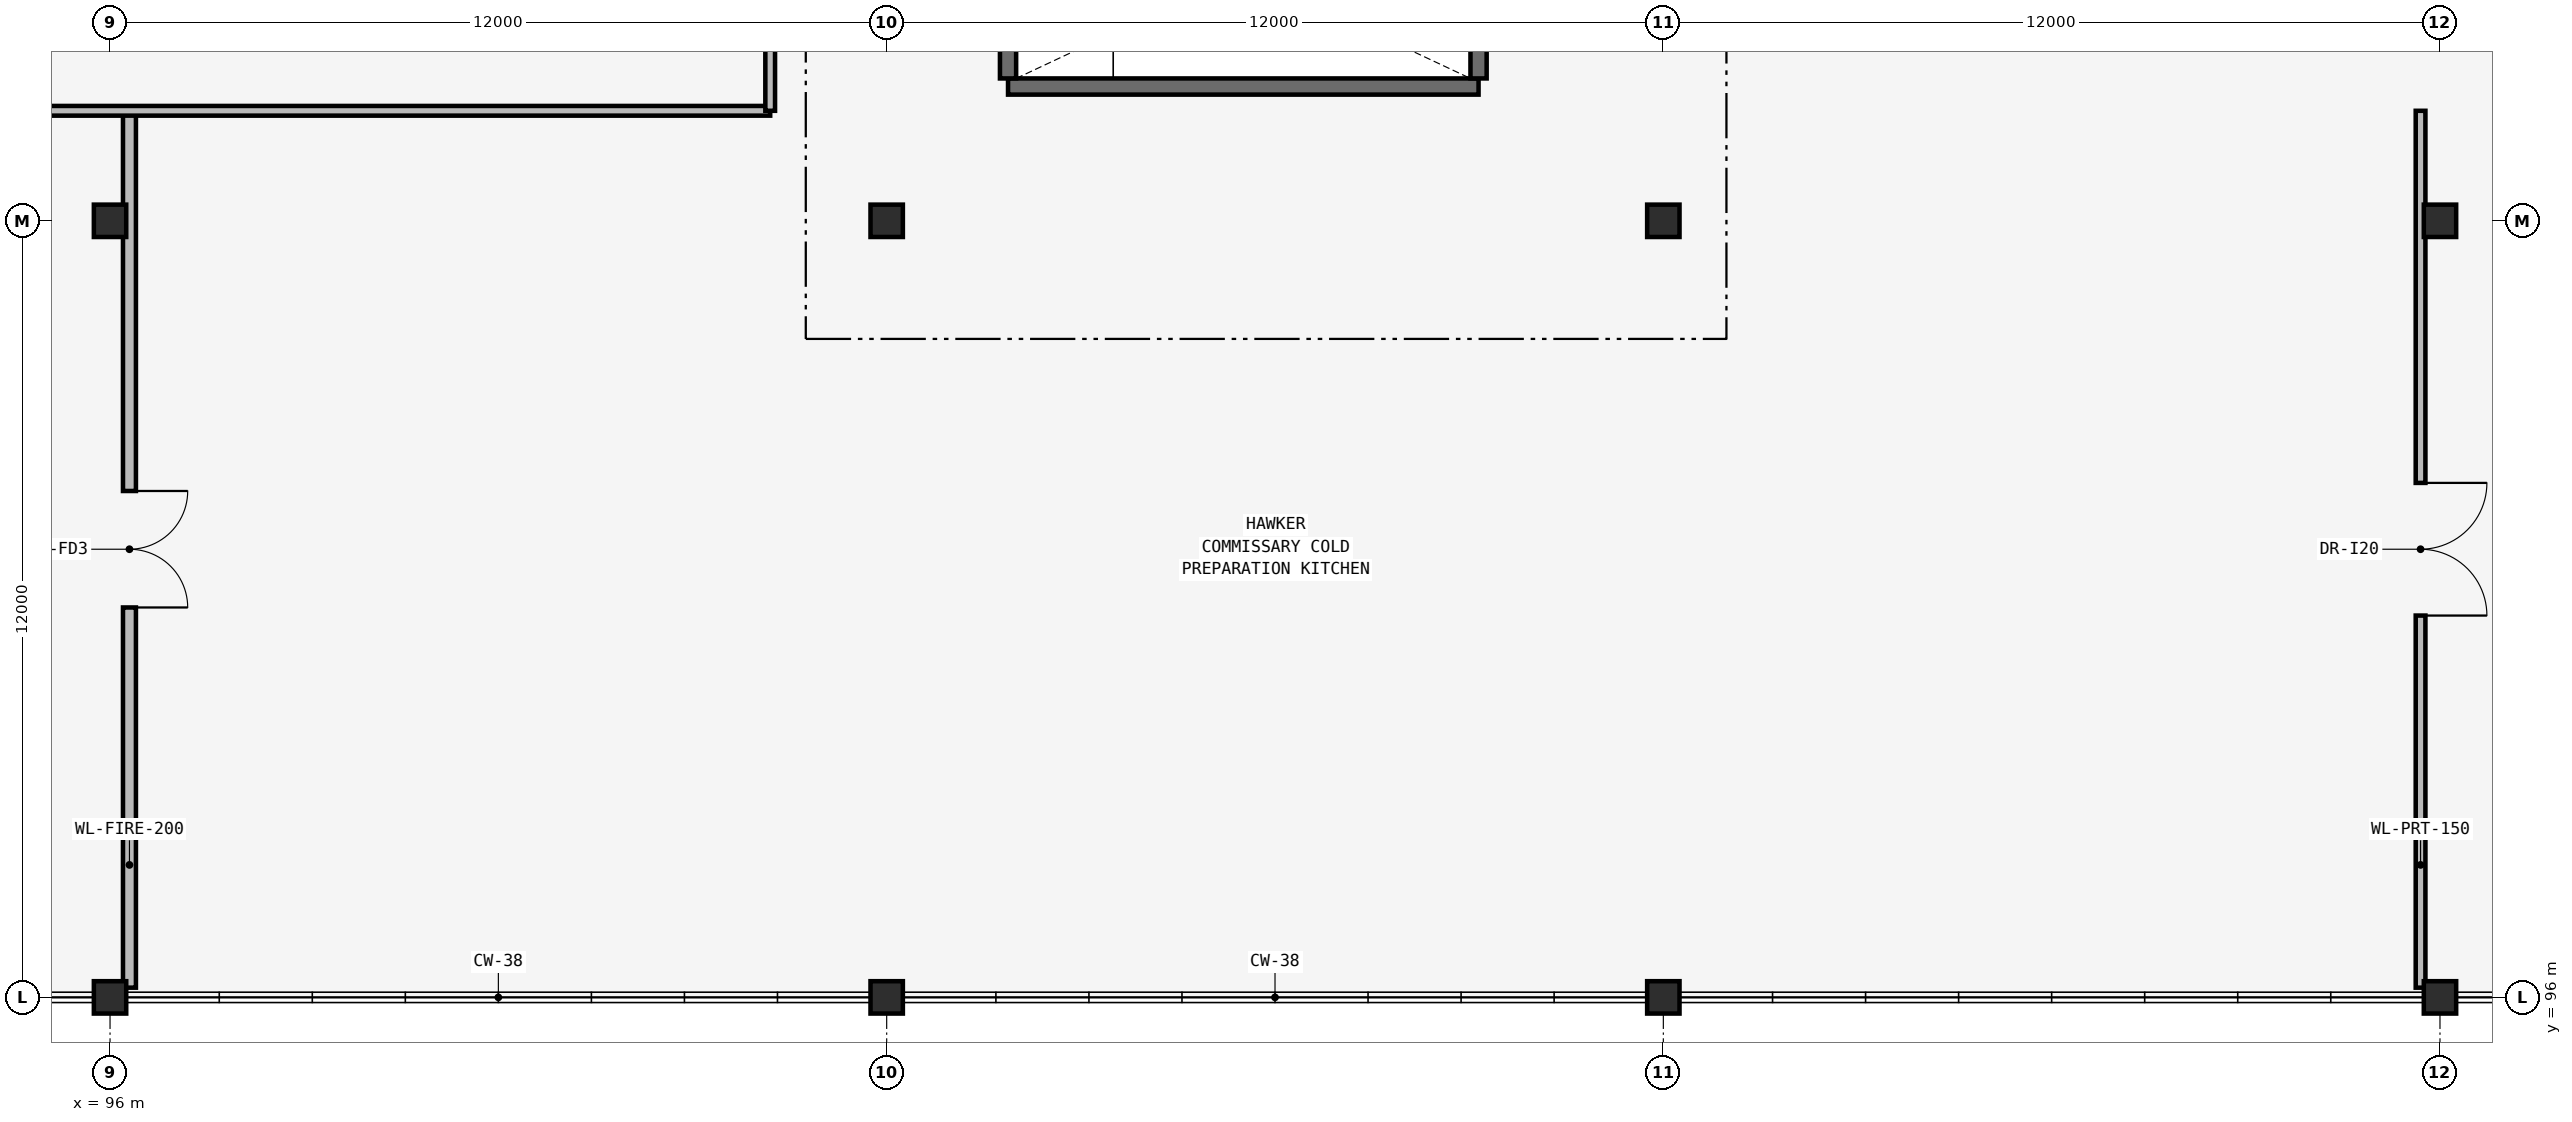
"""IFC4 building model, lengths in metres.
Left out: names, types, materials, properties, quantities, classifications, styles, units other than length and angle.
Written with IfcOpenShell. Run it as: python <this file> out.ifc"""

import sys

from ifc_helpers import new_model, si_unit, direction, frame, frame_2d, origin, origin_2d, place, context, subcontext, project, spatial, rectangle, extrude, element, fill, save


model = new_model("IFC4")
c1 = context("Model", 3, precision=1e-05, world=origin(), true_north=direction((0.0, 1.0)))
c2 = subcontext(c1, "Body", "Model", "MODEL_VIEW")
j1 = project(units=[si_unit("LENGTHUNIT", "METRE"), si_unit("PLANEANGLEUNIT", "RADIAN")], contexts=[c1])
p1 = place(None, origin())
s1 = spatial("IfcSite", under=j1, at=p1, CompositionType="ELEMENT")
p2 = place(p1, origin())
s2 = spatial("IfcBuilding", under=s1, at=p2, CompositionType="ELEMENT")
p3 = place(p2, frame((0.0, 0.0, 5.4)))
s3 = spatial("IfcBuildingStorey", under=s2, at=p3, CompositionType="ELEMENT", Elevation=5.4)
for number, where, z_axis, x_axis in (
    (1, (96.0, 96.0, 0.0), (0.0, 0.0, 1.0), (1.0, 0.0, 0.0)),
    (2, (96.0, 108.0, 0.0), (0.0, 0.0, 1.0), (1.0, 0.0, 0.0)),
    (3, (108.0, 96.0, 0.0), (0.0, 0.0, 1.0), (1.0, 0.0, 0.0)),
    (4, (108.0, 108.0, 0.0), (0.0, 0.0, 1.0), (1.0, 0.0, 0.0)),
    (5, (120.0, 96.0, 0.0), (0.0, 0.0, 1.0), (1.0, 0.0, 0.0)),
    (6, (120.0, 108.0, 0.0), (0.0, 0.0, 1.0), (1.0, 0.0, 0.0)),
    (7, (132.0, 96.0, 0.0), (0.0, 0.0, 1.0), (1.0, 0.0, 0.0)),
    (8, (132.0, 108.0, 0.0), (0.0, 0.0, 1.0), (1.0, 0.0, 0.0)),
):
    element("IfcColumn", number, at=place(p3, frame(where, z_axis=z_axis, x_axis=x_axis)), inside=s3, PredefinedType="COLUMN", context=c2, shape_type="SweptSolid", body=[
        extrude(rectangle(XDim=0.5, YDim=0.5, at=origin_2d()), origin(), (0.0, 0.0, 1.0), 4.8),
    ])
p4 = place(p3, frame((109.875, 110.075, 0.0), z_axis=(0.0, 0.0, 1.0), x_axis=(1.0, 0.0, 0.0)))
e9 = element("IfcWall", 9, at=p4, inside=s3, PredefinedType="SHEAR", context=c2, shape_type="SweptSolid", body=[
    extrude(rectangle(XDim=7.27, YDim=0.25, at=frame_2d((3.635, 0.0))), origin(), (0.0, 0.0, 1.0), 4.52),
])
for number, where, z_axis, x_axis in (
    (10, (109.875, 110.2, 0.0), (0.0, 0.0, 1.0), (0.0, 1.0, 0.0)),
    (11, (117.145, 110.2, 0.0), (0.0, 0.0, 1.0), (0.0, 1.0, 0.0)),
):
    element("IfcWall", number, at=place(p3, frame(where, z_axis=z_axis, x_axis=x_axis)), inside=s3, PredefinedType="SHEAR", context=c2, shape_type="SweptSolid", body=[
        extrude(rectangle(XDim=3.3, YDim=0.25, at=frame_2d((1.65, 0.0))), origin(), (0.0, 0.0, 1.0), 4.52),
    ])
p5 = place(p3, frame((96.3, 96.15, 0.0), z_axis=(0.0, 0.0, 1.0), x_axis=(0.0, 1.0, 0.0)))
e12 = element("IfcWall", 12, at=p5, inside=s3, PredefinedType="SOLIDWALL", context=c2, shape_type="SweptSolid", body=[
    extrude(rectangle(XDim=13.55, YDim=0.2, at=frame_2d((6.775, 0.0))), origin(), (0.0, 0.0, 1.0), 4.52),
])
p6 = place(p5, frame((5.875, 0.0, 0.0)))
e13 = element("IfcOpeningElement", 13, at=p6, cuts=e12, PredefinedType="OPENING", context=c2, shape_type="SweptSolid", body=[
    extrude(rectangle(XDim=1.8, YDim=2.2, at=frame_2d((0.9, 1.1))), frame((0.0, 0.115, 0.0), z_axis=(0.0, -1.0, 0.0), x_axis=(1.0, 0.0, 0.0)), (0.0, 0.0, 1.0), 0.23),
])
p7 = place(p3, frame((131.7, 96.15, 0.0), z_axis=(0.0, 0.0, 1.0), x_axis=(0.0, 1.0, 0.0)))
e14 = element("IfcWall", 14, at=p7, inside=s3, PredefinedType="PARTITIONING", context=c2, shape_type="SweptSolid", body=[
    extrude(rectangle(XDim=13.55, YDim=0.15, at=frame_2d((6.775, 0.0))), origin(), (0.0, 0.0, 1.0), 4.52),
])
p8 = place(p7, frame((5.75, 0.0, 0.0)))
e15 = element("IfcOpeningElement", 15, at=p8, cuts=e14, PredefinedType="OPENING", context=c2, shape_type="SweptSolid", body=[
    extrude(rectangle(XDim=2.05, YDim=2.25, at=frame_2d((1.025, 1.125))), frame((0.0, 0.09, 0.0), z_axis=(0.0, -1.0, 0.0), x_axis=(1.0, 0.0, 0.0)), (0.0, 0.0, 1.0), 0.18),
])
p9 = place(p3, frame((69.8, 109.7, 0.0), z_axis=(0.0, 0.0, 1.0), x_axis=(1.0, 0.0, 0.0)))
e16 = element("IfcWall", 16, at=p9, inside=s3, PredefinedType="PARTITIONING", context=c2, shape_type="SweptSolid", body=[
    extrude(rectangle(XDim=36.4, YDim=0.15, at=frame_2d((18.2, 0.0))), origin(), (0.0, 0.0, 1.0), 4.52),
])
p10 = place(p9, frame((17.475, 0.0, 0.0)))
e17 = element("IfcOpeningElement", 17, at=p10, cuts=e16, PredefinedType="OPENING", context=c2, shape_type="SweptSolid", body=[
    extrude(rectangle(XDim=1.45, YDim=2.15, at=frame_2d((0.725, 1.075))), frame((0.0, 0.09, 0.0), z_axis=(0.0, -1.0, 0.0), x_axis=(1.0, 0.0, 0.0)), (0.0, 0.0, 1.0), 0.18),
])
p11 = place(p3, frame((106.2, 109.7, 0.0), z_axis=(0.0, 0.0, 1.0), x_axis=(0.0, 1.0, 0.0)))
e18 = element("IfcWall", 18, at=p11, inside=s3, PredefinedType="PARTITIONING", context=c2, shape_type="SweptSolid", body=[
    extrude(rectangle(XDim=10.15, YDim=0.15, at=frame_2d((5.075, 0.0))), origin(), (0.0, 0.0, 1.0), 4.52),
])
p12 = place(p11, frame((4.35, 0.0, 0.0)))
e19 = element("IfcOpeningElement", 19, at=p12, cuts=e18, PredefinedType="OPENING", context=c2, shape_type="SweptSolid", body=[
    extrude(rectangle(XDim=1.45, YDim=2.15, at=frame_2d((0.725, 1.075))), frame((0.0, 0.09, 0.0), z_axis=(0.0, -1.0, 0.0), x_axis=(1.0, 0.0, 0.0)), (0.0, 0.0, 1.0), 0.18),
])
p13 = place(p6, origin())
e20 = element("IfcDoor", 20, at=p13, inside=s3, OperationType="DOUBLE_DOOR_SINGLE_SWING", PredefinedType="DOOR", context=c2, shape_type="SweptSolid", body=[
    extrude(rectangle(XDim=1.8, YDim=2.2, at=frame_2d((0.9, 1.1))), frame((0.0, 0.025, 0.0), z_axis=(0.0, -1.0, 0.0), x_axis=(1.0, 0.0, 0.0)), (0.0, 0.0, 1.0), 0.05),
])
fill(e13, e20)
p14 = place(p8, origin())
e21 = element("IfcDoor", 21, at=p14, inside=s3, OperationType="DOUBLE_DOOR_SINGLE_SWING", PredefinedType="DOOR", context=c2, shape_type="SweptSolid", body=[
    extrude(rectangle(XDim=2.05, YDim=2.25, at=frame_2d((1.025, 1.125))), frame((0.0, 0.025, 0.0), z_axis=(0.0, -1.0, 0.0), x_axis=(1.0, 0.0, 0.0)), (0.0, 0.0, 1.0), 0.05),
])
fill(e15, e21)
save(model, sys.argv[1])
